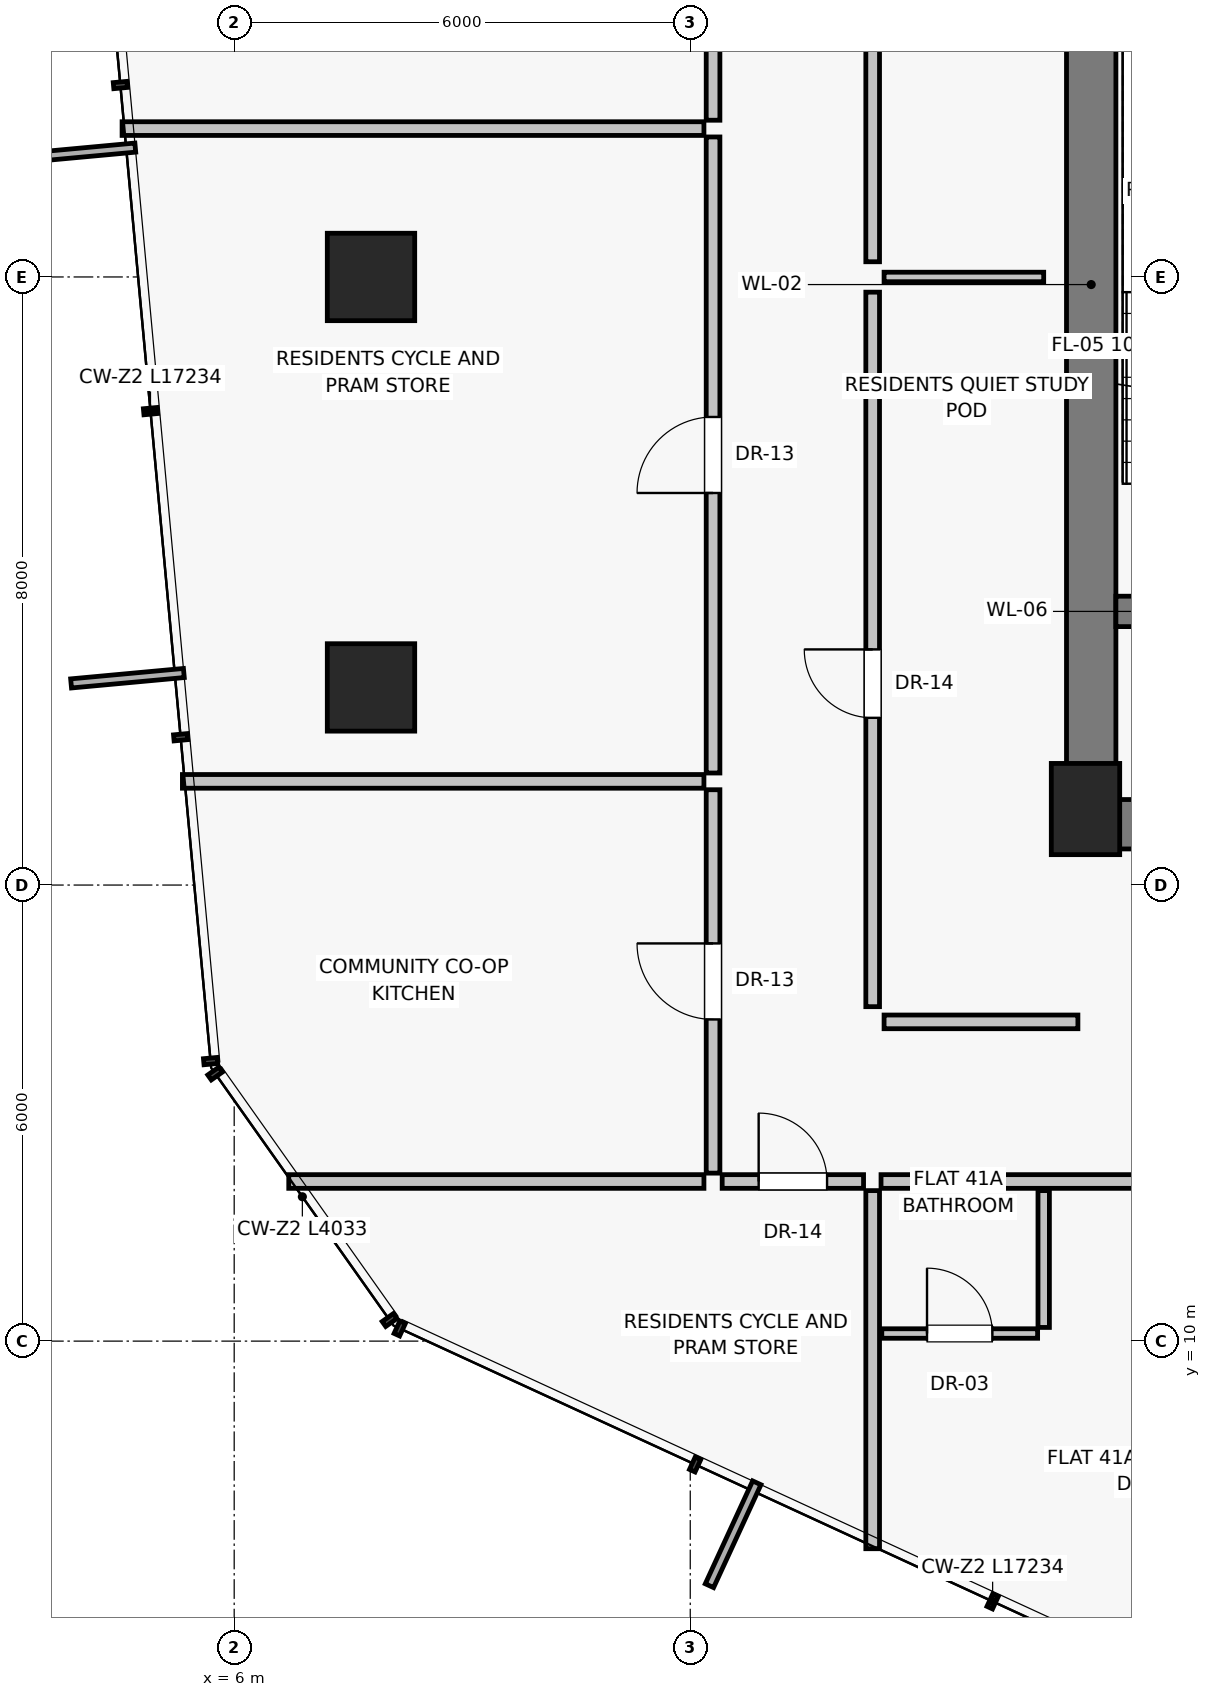
"""IFC4 building model, lengths in metres.
Left out: names, types, materials, properties, quantities, classifications, styles, units other than length and angle.
Written with IfcOpenShell. Run it as: python <this file> out.ifc"""

import sys

from ifc_helpers import new_model, si_unit, direction, frame, frame_2d, origin, origin_2d, place, context, subcontext, project, spatial, rectangle, extrude, source, transform, mapped, element, fill, save


model = new_model("IFC4")
c1 = context("Model", 3, precision=1e-05, world=origin(), true_north=direction((0.0, 1.0)))
c2 = subcontext(c1, "Body", "Model", "MODEL_VIEW")
j1 = project(units=[si_unit("LENGTHUNIT", "METRE"), si_unit("PLANEANGLEUNIT", "RADIAN")], contexts=[c1])
p1 = place(None, origin())
s1 = spatial("IfcSite", under=j1, at=p1, CompositionType="ELEMENT")
p2 = place(p1, origin())
s2 = spatial("IfcBuilding", under=s1, at=p2, CompositionType="ELEMENT")
p3 = place(p2, frame((0.0, 0.0, 145.75)))
s3 = spatial("IfcBuildingStorey", under=s2, at=p3, CompositionType="ELEMENT", Elevation=145.75)
p4 = place(p3, frame((17.2, 17.0, 0.0), z_axis=(0.0, 0.0, 1.0), x_axis=(1.0, 0.0, 0.0)))
e1 = element("IfcColumn", 1, at=p4, inside=s3, PredefinedType="PILASTER", context=c2, shape_type="SweptSolid", body=[
    extrude(rectangle(XDim=0.9, YDim=1.2, at=origin_2d()), origin(), (0.0, 0.0, 1.0), 3.25),
])
for number, where, z_axis, x_axis in (
    (2, (7.8, 24.0, 0.0), (0.0, 0.0, 1.0), (1.0, 0.0, 0.0)),
    (3, (7.8, 18.6, 0.0), (0.0, 0.0, 1.0), (1.0, 0.0, 0.0)),
):
    element("IfcColumn", number, at=place(p3, frame(where, z_axis=z_axis, x_axis=x_axis)), inside=s3, PredefinedType="COLUMN", context=c2, shape_type="SweptSolid", body=[
        extrude(rectangle(XDim=1.15, YDim=1.15, at=origin_2d()), origin(), (0.0, 0.0, 1.0), 3.25),
    ])
p5 = place(p3, frame((17.275, 16.8, 0.0), z_axis=(0.0, 0.0, 1.0), x_axis=(0.0, 1.0, 0.0)))
e4 = element("IfcWall", 4, at=p5, inside=s3, PredefinedType="SHEAR", context=c2, shape_type="SweptSolid", body=[
    extrude(rectangle(XDim=14.2, YDim=0.65, at=frame_2d((7.1, 0.0))), origin(), (0.0, 0.0, 1.0), 3.0),
])
p6 = place(p3, frame((17.2, 16.8, 0.0), z_axis=(0.0, 0.0, 1.0), x_axis=(1.0, 0.0, 0.0)))
e5 = element("IfcWall", 5, at=p6, inside=s3, PredefinedType="SHEAR", context=c2, shape_type="SweptSolid", body=[
    extrude(rectangle(XDim=5.85, YDim=0.65, at=frame_2d((2.925, 0.0))), origin(), (0.0, 0.0, 1.0), 3.0),
])
p7 = place(p6, frame((1.15, 0.0, 0.0)))
e6 = element("IfcOpeningElement", 6, at=p7, cuts=e5, PredefinedType="OPENING", context=c2, shape_type="SweptSolid", body=[
    extrude(rectangle(XDim=1.2, YDim=2.03, at=frame_2d((0.6, 1.015))), frame((0.0, 0.335, 0.0), z_axis=(0.0, -1.0, 0.0), x_axis=(1.0, 0.0, 0.0)), (0.0, 0.0, 1.0), 0.67),
])
p8 = place(p3, frame((17.6, 19.6, 0.0), z_axis=(0.0, 0.0, 1.0), x_axis=(1.0, 0.0, 0.0)))
e7 = element("IfcWall", 7, at=p8, inside=s3, PredefinedType="SHEAR", context=c2, shape_type="SweptSolid", body=[
    extrude(rectangle(XDim=3.4, YDim=0.4, at=frame_2d((1.7, 0.0))), origin(), (0.0, 0.0, 1.0), 3.0),
])
p9 = place(p8, frame((1.05, 0.0, 0.0)))
e8 = element("IfcOpeningElement", 8, at=p9, cuts=e7, PredefinedType="OPENING", context=c2, shape_type="SweptSolid", body=[
    extrude(rectangle(XDim=1.1, YDim=2.03, at=frame_2d((0.55, 1.015))), frame((0.0, 0.21, 0.0), z_axis=(0.0, -1.0, 0.0), x_axis=(1.0, 0.0, 0.0)), (0.0, 0.0, 1.0), 0.42),
])
p10 = place(p3, frame((14.4, 14.4, 0.0), z_axis=(0.0, 0.0, 1.0), x_axis=(0.0, 1.0, 0.0)))
e9 = element("IfcWall", 9, at=p10, inside=s3, PredefinedType="PARTITIONING", context=c2, shape_type="SweptSolid", body=[
    extrude(rectangle(XDim=9.4, YDim=0.18, at=frame_2d((4.7, 0.0))), origin(), (0.0, 0.0, 1.0), 3.0),
])
p11 = place(p10, frame((3.8, 0.0, 0.0)))
e10 = element("IfcOpeningElement", 10, at=p11, cuts=e9, PredefinedType="OPENING", context=c2, shape_type="SweptSolid", body=[
    extrude(rectangle(XDim=0.9, YDim=2.01, at=frame_2d((0.45, 1.005))), frame((0.0, 0.1, 0.0), z_axis=(0.0, -1.0, 0.0), x_axis=(1.0, 0.0, 0.0)), (0.0, 0.0, 1.0), 0.2),
])
p12 = place(p3, frame((14.4, 24.2, 0.0), z_axis=(0.0, 0.0, 1.0), x_axis=(0.0, 1.0, 0.0)))
e11 = element("IfcWall", 11, at=p12, inside=s3, PredefinedType="PARTITIONING", context=c2, shape_type="SweptSolid", body=[
    extrude(rectangle(XDim=9.2, YDim=0.18, at=frame_2d((4.6, 0.0))), origin(), (0.0, 0.0, 1.0), 3.0),
])
p13 = place(p12, frame((3.8, 0.0, 0.0)))
e12 = element("IfcOpeningElement", 12, at=p13, cuts=e11, PredefinedType="OPENING", context=c2, shape_type="SweptSolid", body=[
    extrude(rectangle(XDim=0.9, YDim=2.01, at=frame_2d((0.45, 1.005))), frame((0.0, 0.1, 0.0), z_axis=(0.0, -1.0, 0.0), x_axis=(1.0, 0.0, 0.0)), (0.0, 0.0, 1.0), 0.2),
])
p14 = place(p3, frame((14.55, 24.0, 0.0), z_axis=(0.0, 0.0, 1.0), x_axis=(1.0, 0.0, 0.0)))
e13 = element("IfcWall", 13, at=p14, inside=s3, PredefinedType="PARTITIONING", context=c2, shape_type="SweptSolid", body=[
    extrude(rectangle(XDim=2.1, YDim=0.125, at=frame_2d((1.05, 0.0))), origin(), (0.0, 0.0, 1.0), 3.0),
])
p15 = place(p3, frame((14.55, 14.2, 0.0), z_axis=(0.0, 0.0, 1.0), x_axis=(1.0, 0.0, 0.0)))
e14 = element("IfcWall", 14, at=p15, inside=s3, PredefinedType="PARTITIONING", context=c2, shape_type="SweptSolid", body=[
    extrude(rectangle(XDim=2.55, YDim=0.18, at=frame_2d((1.275, 0.0))), origin(), (0.0, 0.0, 1.0), 3.0),
])
p16 = place(p3, frame((14.4, 11.98, 0.0), z_axis=(0.0, 0.0, 1.0), x_axis=(0.0, -1.0, 0.0)))
e15 = element("IfcWall", 15, at=p16, inside=s3, PredefinedType="PARTITIONING", context=c2, shape_type="SweptSolid", body=[
    extrude(rectangle(XDim=4.711, YDim=0.18, at=frame_2d((2.355, 0.0))), origin(), (0.0, 0.0, 1.0), 3.0),
])
p17 = place(p3, frame((14.51, 12.1, 0.0), z_axis=(0.0, 0.0, 1.0), x_axis=(1.0, 0.0, 0.0)))
e16 = element("IfcWall", 16, at=p17, inside=s3, PredefinedType="PARTITIONING", context=c2, shape_type="SweptSolid", body=[
    extrude(rectangle(XDim=11.124, YDim=0.18, at=frame_2d((5.562, 0.0))), origin(), (0.0, 0.0, 1.0), 2.58),
])
p18 = place(p17, frame((3.717, 0.0, 0.0)))
e17 = element("IfcOpeningElement", 17, at=p18, cuts=e16, PredefinedType="OPENING", context=c2, shape_type="SweptSolid", body=[
    extrude(rectangle(XDim=0.95, YDim=2.02, at=frame_2d((0.475, 1.01))), frame((0.0, 0.1, 0.0), z_axis=(0.0, -1.0, 0.0), x_axis=(1.0, 0.0, 0.0)), (0.0, 0.0, 1.0), 0.2),
])
p19 = place(p3, frame((16.65, 11.98, 0.0), z_axis=(0.0, 0.0, 1.0), x_axis=(0.0, -1.0, 0.0)))
e18 = element("IfcWall", 18, at=p19, inside=s3, PredefinedType="PARTITIONING", context=c2, shape_type="SweptSolid", body=[
    extrude(rectangle(XDim=1.8, YDim=0.15, at=frame_2d((0.9, 0.0))), origin(), (0.0, 0.0, 1.0), 3.0),
])
p20 = place(p3, frame((14.52, 10.1, 0.0), z_axis=(0.0, 0.0, 1.0), x_axis=(1.0, 0.0, 0.0)))
e19 = element("IfcWall", 19, at=p20, inside=s3, PredefinedType="PARTITIONING", context=c2, shape_type="SweptSolid", body=[
    extrude(rectangle(XDim=2.05, YDim=0.125, at=frame_2d((1.025, 0.0))), origin(), (0.0, 0.0, 1.0), 3.0),
])
p21 = place(p20, frame((0.595, 0.0, 0.0)))
e20 = element("IfcOpeningElement", 20, at=p21, cuts=e19, PredefinedType="OPENING", context=c2, shape_type="SweptSolid", body=[
    extrude(rectangle(XDim=0.86, YDim=2.01, at=frame_2d((0.43, 1.005))), frame((0.0, 0.073, 0.0), z_axis=(0.0, -1.0, 0.0), x_axis=(1.0, 0.0, 0.0)), (0.0, 0.0, 1.0), 0.145),
])
p22 = place(p3, frame((12.18, 12.1, 0.0), z_axis=(0.0, 0.0, 1.0), x_axis=(-1.0, 0.0, 0.0)))
e21 = element("IfcWall", 21, at=p22, inside=s3, PredefinedType="PARTITIONING", context=c2, shape_type="SweptSolid", body=[
    extrude(rectangle(XDim=5.462, YDim=0.18, at=frame_2d((2.731, 0.0))), origin(), (0.0, 0.0, 1.0), 3.0),
])
p23 = place(p3, frame((12.3, 12.21, 0.0), z_axis=(0.0, 0.0, 1.0), x_axis=(0.0, 1.0, 0.0)))
e22 = element("IfcWall", 22, at=p23, inside=s3, PredefinedType="PARTITIONING", context=c2, shape_type="SweptSolid", body=[
    extrude(rectangle(XDim=5.044, YDim=0.18, at=frame_2d((2.522, 0.0))), origin(), (0.0, 0.0, 1.0), 3.0),
])
p24 = place(p23, frame((2.022, 0.0, 0.0)))
e23 = element("IfcOpeningElement", 23, at=p24, cuts=e22, PredefinedType="OPENING", context=c2, shape_type="SweptSolid", body=[
    extrude(rectangle(XDim=1.0, YDim=2.01, at=frame_2d((0.5, 1.005))), frame((0.0, 0.1, 0.0), z_axis=(0.0, -1.0, 0.0), x_axis=(1.0, 0.0, 0.0)), (0.0, 0.0, 1.0), 0.2),
])
p25 = place(p3, frame((12.3, 17.474, 0.0), z_axis=(0.0, 0.0, 1.0), x_axis=(0.0, 1.0, 0.0)))
e24 = element("IfcWall", 24, at=p25, inside=s3, PredefinedType="PARTITIONING", context=c2, shape_type="SweptSolid", body=[
    extrude(rectangle(XDim=8.368, YDim=0.18, at=frame_2d((4.184, 0.0))), origin(), (0.0, 0.0, 1.0), 2.58),
])
p26 = place(p25, frame((3.684, 0.0, 0.0)))
e25 = element("IfcOpeningElement", 25, at=p26, cuts=e24, PredefinedType="OPENING", context=c2, shape_type="SweptSolid", body=[
    extrude(rectangle(XDim=1.0, YDim=2.01, at=frame_2d((0.5, 1.005))), frame((0.0, 0.1, 0.0), z_axis=(0.0, -1.0, 0.0), x_axis=(1.0, 0.0, 0.0)), (0.0, 0.0, 1.0), 0.2),
])
p27 = place(p3, frame((12.18, 17.364, 0.0), z_axis=(0.0, 0.0, 1.0), x_axis=(-1.0, 0.0, 0.0)))
e26 = element("IfcWall", 26, at=p27, inside=s3, PredefinedType="PARTITIONING", context=c2, shape_type="SweptSolid", body=[
    extrude(rectangle(XDim=6.861, YDim=0.18, at=frame_2d((3.431, 0.0))), origin(), (0.0, 0.0, 1.0), 2.378),
])
p28 = place(p3, frame((12.18, 25.952, 0.0), z_axis=(0.0, 0.0, 1.0), x_axis=(-1.0, 0.0, 0.0)))
e27 = element("IfcWall", 27, at=p28, inside=s3, PredefinedType="PARTITIONING", context=c2, shape_type="SweptSolid", body=[
    extrude(rectangle(XDim=7.655, YDim=0.18, at=frame_2d((3.827, 0.0))), origin(), (0.0, 0.0, 1.0), 3.0),
])
p29 = place(p3, frame((12.3, 26.062, 0.0), z_axis=(0.0, 0.0, 1.0), x_axis=(0.0, 1.0, 0.0)))
e28 = element("IfcWall", 28, at=p29, inside=s3, PredefinedType="PARTITIONING", context=c2, shape_type="SweptSolid", body=[
    extrude(rectangle(XDim=3.484, YDim=0.18, at=frame_2d((1.742, 0.0))), origin(), (0.0, 0.0, 1.0), 2.58),
])
p30 = place(p29, frame((1.242, 0.0, 0.0)))
e29 = element("IfcOpeningElement", 29, at=p30, cuts=e28, PredefinedType="OPENING", context=c2, shape_type="SweptSolid", body=[
    extrude(rectangle(XDim=1.0, YDim=2.01, at=frame_2d((0.5, 1.005))), frame((0.0, 0.1, 0.0), z_axis=(0.0, -1.0, 0.0), x_axis=(1.0, 0.0, 0.0)), (0.0, 0.0, 1.0), 0.2),
])
p31 = place(p3, frame((12.42, 12.1, 0.0), z_axis=(0.0, 0.0, 1.0), x_axis=(1.0, 0.0, 0.0)))
e30 = element("IfcWall", 30, at=p31, inside=s3, PredefinedType="PARTITIONING", context=c2, shape_type="SweptSolid", body=[
    extrude(rectangle(XDim=1.86, YDim=0.18, at=frame_2d((0.93, 0.0))), origin(), (0.0, 0.0, 1.0), 3.0),
])
p32 = place(p31, frame((0.48, 0.0, 0.0)))
e31 = element("IfcOpeningElement", 31, at=p32, cuts=e30, PredefinedType="OPENING", context=c2, shape_type="SweptSolid", body=[
    extrude(rectangle(XDim=0.9, YDim=2.01, at=frame_2d((0.45, 1.005))), frame((0.0, 0.1, 0.0), z_axis=(0.0, -1.0, 0.0), x_axis=(1.0, 0.0, 0.0)), (0.0, 0.0, 1.0), 0.2),
])
m1 = source(origin(), c2, "Body", "SweptSolid", [
    extrude(rectangle(XDim=0.9, YDim=2.01, at=frame_2d((0.45, 1.005))), frame((0.0, 0.025, 0.0), z_axis=(0.0, -1.0, 0.0), x_axis=(1.0, 0.0, 0.0)), (0.0, 0.0, 1.0), 0.05),
])
p33 = place(p11, origin())
e32 = element("IfcDoor", 32, at=p33, inside=s3, OperationType="SINGLE_SWING_RIGHT", PredefinedType="DOOR", context=c2, shape_type="MappedRepresentation", body=[
    mapped(m1, transform((0.0, 0.0, 0.0), scale=1.0)),
])
fill(e10, e32)
m2 = source(origin(), c2, "Body", "SweptSolid", [
    extrude(rectangle(XDim=0.86, YDim=2.01, at=frame_2d((0.43, 1.005))), frame((0.0, 0.025, 0.0), z_axis=(0.0, -1.0, 0.0), x_axis=(1.0, 0.0, 0.0)), (0.0, 0.0, 1.0), 0.05),
])
p34 = place(p21, origin())
e33 = element("IfcDoor", 33, at=p34, inside=s3, OperationType="SINGLE_SWING_LEFT", PredefinedType="DOOR", context=c2, shape_type="MappedRepresentation", body=[
    mapped(m2, transform((0.0, 0.0, 0.0), scale=1.0)),
])
fill(e20, e33)
m3 = source(origin(), c2, "Body", "SweptSolid", [
    extrude(rectangle(XDim=1.0, YDim=2.01, at=frame_2d((0.5, 1.005))), frame((0.0, 0.025, 0.0), z_axis=(0.0, -1.0, 0.0), x_axis=(1.0, 0.0, 0.0)), (0.0, 0.0, 1.0), 0.05),
])
p35 = place(p24, origin())
e34 = element("IfcDoor", 34, at=p35, inside=s3, OperationType="SINGLE_SWING_RIGHT", PredefinedType="DOOR", context=c2, shape_type="MappedRepresentation", body=[
    mapped(m3, transform((0.0, 0.0, 0.0), scale=1.0)),
])
fill(e23, e34)
p36 = place(p26, origin())
e35 = element("IfcDoor", 35, at=p36, inside=s3, OperationType="SINGLE_SWING_LEFT", PredefinedType="DOOR", context=c2, shape_type="MappedRepresentation", body=[
    mapped(m3, transform((0.0, 0.0, 0.0), scale=1.0)),
])
fill(e25, e35)
p37 = place(p32, origin())
e36 = element("IfcDoor", 36, at=p37, inside=s3, OperationType="SINGLE_SWING_LEFT", PredefinedType="DOOR", context=c2, shape_type="MappedRepresentation", body=[
    mapped(m1, transform((0.0, 0.0, 0.0), scale=1.0)),
])
fill(e31, e36)
save(model, sys.argv[1])
